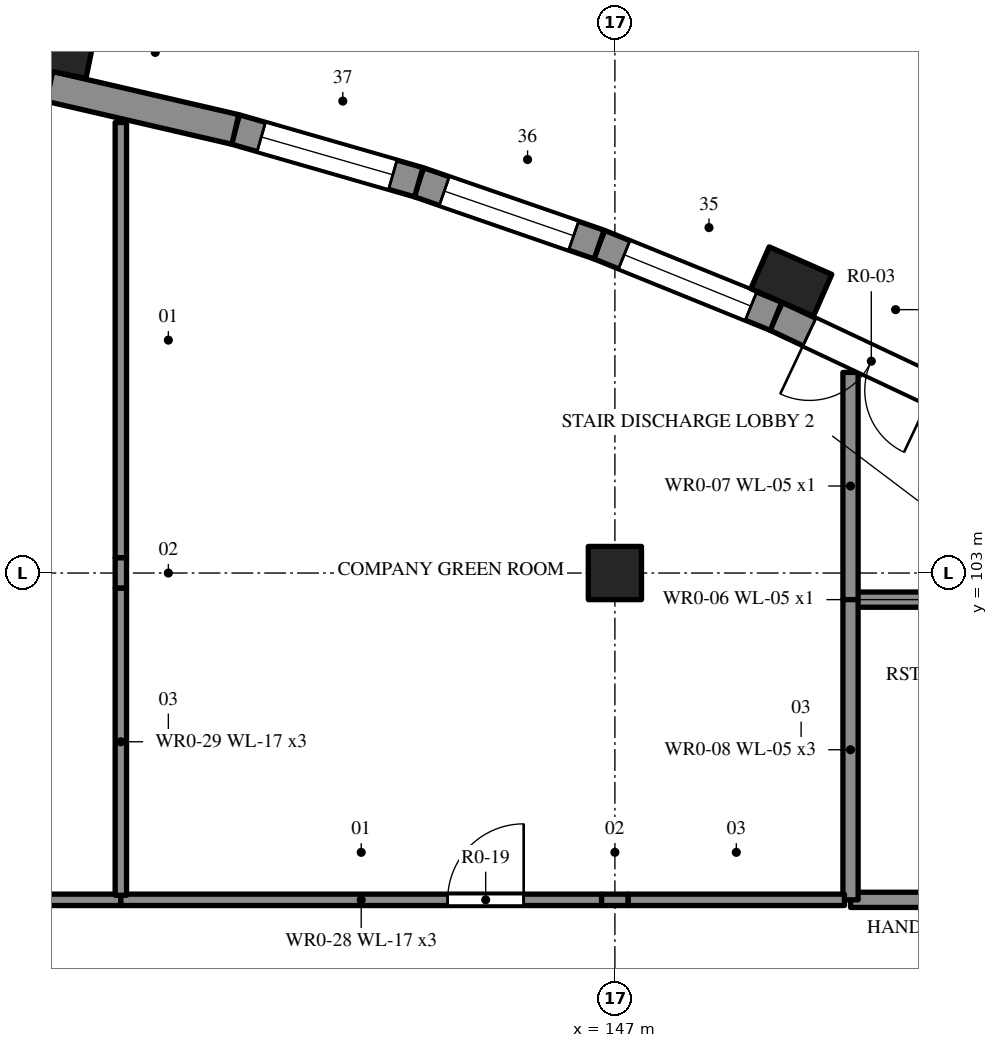
"""IFC4 building model, lengths in metres.
Left out: names, types, materials, properties, quantities, classifications, styles, units other than length and angle.
Written with IfcOpenShell. Run it as: python <this file> out.ifc"""

import sys

from ifc_helpers import new_model, si_unit, direction, frame, frame_2d, origin, origin_2d, place, context, subcontext, project, spatial, rectangle, extrude, element, fill, save


model = new_model("IFC4")
c1 = context("Model", 3, precision=1e-05, world=origin(), true_north=direction((0.0, 1.0)))
c2 = subcontext(c1, "Body", "Model", "MODEL_VIEW")
j1 = project(units=[si_unit("LENGTHUNIT", "METRE"), si_unit("PLANEANGLEUNIT", "RADIAN")], contexts=[c1])
p1 = place(None, origin())
s1 = spatial("IfcSite", under=j1, at=p1, CompositionType="ELEMENT")
p2 = place(p1, origin())
s2 = spatial("IfcBuilding", under=s1, at=p2, CompositionType="ELEMENT")
p3 = place(p2, origin())
s3 = spatial("IfcBuildingStorey", under=s2, at=p3, CompositionType="ELEMENT", Elevation=0.0)
p4 = place(p3, frame((147.0, 103.0, -0.25), z_axis=(0.0, 0.0, 1.0), x_axis=(1.0, 0.0, 0.0)))
e1 = element("IfcColumn", 1, at=p4, inside=s3, PredefinedType="COLUMN", context=c2, shape_type="SweptSolid", body=[
    extrude(rectangle(XDim=0.7, YDim=0.7, at=origin_2d()), origin(), (0.0, 0.0, 1.0), 5.37),
])
p5 = place(p3, frame((150.1, 102.65, -0.25), z_axis=(0.0, 0.0, 1.0), x_axis=(1.0, 0.0, 0.0)))
e2 = element("IfcWall", 2, at=p5, inside=s3, PredefinedType="SHEAR", context=c2, shape_type="SweptSolid", body=[
    extrude(rectangle(XDim=5.451, YDim=0.2, at=frame_2d((2.726, 0.0))), origin(), (0.0, 0.0, 1.0), 5.65),
])
p6 = place(p5, frame((2.223, 0.0, 0.25)))
e3 = element("IfcOpeningElement", 3, at=p6, cuts=e2, PredefinedType="OPENING", context=c2, shape_type="SweptSolid", body=[
    extrude(rectangle(XDim=1.1, YDim=2.1, at=frame_2d((0.55, 1.05))), frame((0.0, 0.11, 0.0), z_axis=(0.0, -1.0, 0.0), x_axis=(1.0, 0.0, 0.0)), (0.0, 0.0, 1.0), 0.22),
])
p7 = place(p3, frame((150.1, 102.65, -0.25), z_axis=(0.0, 0.0, 1.0), x_axis=(0.0, 1.0, 0.0)))
e4 = element("IfcWall", 4, at=p7, inside=s3, PredefinedType="SHEAR", context=c2, shape_type="SweptSolid", body=[
    extrude(rectangle(XDim=2.99, YDim=0.2, at=frame_2d((1.495, 0.0))), origin(), (0.0, 0.0, 1.0), 5.65),
])
p8 = place(p3, frame((158.3, 98.7, -0.25), z_axis=(0.0, 0.0, 1.0), x_axis=(-1.0, 0.0, 0.0)))
e5 = element("IfcWall", 5, at=p8, inside=s3, PredefinedType="SHEAR", context=c2, shape_type="SweptSolid", body=[
    extrude(rectangle(XDim=8.2, YDim=0.2, at=frame_2d((4.1, 0.0))), origin(), (0.0, 0.0, 1.0), 5.65),
])
p9 = place(p8, frame((0.25, 0.0, 0.25)))
e6 = element("IfcOpeningElement", 6, at=p9, cuts=e5, PredefinedType="OPENING", context=c2, shape_type="SweptSolid", body=[
    extrude(rectangle(XDim=1.0, YDim=2.4, at=frame_2d((0.5, 1.2))), frame((0.0, 0.11, 0.0), z_axis=(0.0, -1.0, 0.0), x_axis=(1.0, 0.0, 0.0)), (0.0, 0.0, 1.0), 0.22),
])
p10 = place(p3, frame((150.1, 98.7, -0.25), z_axis=(0.0, 0.0, 1.0), x_axis=(0.0, 1.0, 0.0)))
e7 = element("IfcWall", 7, at=p10, inside=s3, PredefinedType="SHEAR", context=c2, shape_type="SweptSolid", body=[
    extrude(rectangle(XDim=3.95, YDim=0.2, at=frame_2d((1.975, 0.0))), origin(), (0.0, 0.0, 1.0), 5.65),
])
p11 = place(p3, frame((151.627, 105.196, -0.25), z_axis=(0.0, 0.0, 1.0), x_axis=(-0.904561064695, 0.42634408667, 0.0)))
e8 = element("IfcWall", 8, at=p11, inside=s3, PredefinedType="SOLIDWALL", context=c2, shape_type="SweptSolid", body=[
    extrude(rectangle(XDim=2.772, YDim=0.4, at=frame_2d((1.386, 0.0))), origin(), (0.0, 0.0, 1.0), 5.65),
])
p12 = place(p11, frame((0.486, 0.0, 0.25)))
e9 = element("IfcOpeningElement", 9, at=p12, cuts=e8, PredefinedType="OPENING", context=c2, shape_type="SweptSolid", body=[
    extrude(rectangle(XDim=1.8, YDim=2.4, at=frame_2d((0.9, 1.2))), frame((0.0, 0.21, 0.0), z_axis=(0.0, -1.0, 0.0), x_axis=(1.0, 0.0, 0.0)), (0.0, 0.0, 1.0), 0.42),
])
p13 = place(p3, frame((149.12, 106.378, -0.25), z_axis=(0.0, 0.0, 1.0), x_axis=(-0.926688932252, 0.375829246921, 0.0)))
e10 = element("IfcWall", 10, at=p13, inside=s3, PredefinedType="SOLIDWALL", context=c2, shape_type="SweptSolid", body=[
    extrude(rectangle(XDim=2.511, YDim=0.4, at=frame_2d((1.255, 0.0))), origin(), (0.0, 0.0, 1.0), 5.65),
])
p14 = place(p13, frame((0.355, 0.0, 1.25)))
e11 = element("IfcOpeningElement", 11, at=p14, cuts=e10, PredefinedType="OPENING", context=c2, shape_type="SweptSolid", body=[
    extrude(rectangle(XDim=1.8, YDim=2.1, at=frame_2d((0.9, 1.05))), frame((0.0, 0.21, 0.0), z_axis=(0.0, -1.0, 0.0), x_axis=(1.0, 0.0, 0.0)), (0.0, 0.0, 1.0), 0.42),
])
p15 = place(p3, frame((146.793, 107.322, -0.25), z_axis=(0.0, 0.0, 1.0), x_axis=(-0.945175475032, 0.326562890417, 0.0)))
e12 = element("IfcWall", 12, at=p15, inside=s3, PredefinedType="SOLIDWALL", context=c2, shape_type="SweptSolid", body=[
    extrude(rectangle(XDim=2.511, YDim=0.4, at=frame_2d((1.256, 0.0))), origin(), (0.0, 0.0, 1.0), 5.65),
])
p16 = place(p15, frame((0.355, 0.0, 1.25)))
e13 = element("IfcOpeningElement", 13, at=p16, cuts=e12, PredefinedType="OPENING", context=c2, shape_type="SweptSolid", body=[
    extrude(rectangle(XDim=1.8, YDim=2.1, at=frame_2d((0.9, 1.05))), frame((0.0, 0.21, 0.0), z_axis=(0.0, -1.0, 0.0), x_axis=(1.0, 0.0, 0.0)), (0.0, 0.0, 1.0), 0.42),
])
p17 = place(p3, frame((144.419, 108.142, -0.25), z_axis=(0.0, 0.0, 1.0), x_axis=(-0.961008605775, 0.276518461637, 0.0)))
e14 = element("IfcWall", 14, at=p17, inside=s3, PredefinedType="SOLIDWALL", context=c2, shape_type="SweptSolid", body=[
    extrude(rectangle(XDim=2.511, YDim=0.4, at=frame_2d((1.255, 0.0))), origin(), (0.0, 0.0, 1.0), 5.65),
])
p18 = place(p17, frame((0.355, 0.0, 1.25)))
e15 = element("IfcOpeningElement", 15, at=p18, cuts=e14, PredefinedType="OPENING", context=c2, shape_type="SweptSolid", body=[
    extrude(rectangle(XDim=1.8, YDim=2.1, at=frame_2d((0.9, 1.05))), frame((0.0, 0.21, 0.0), z_axis=(0.0, -1.0, 0.0), x_axis=(1.0, 0.0, 0.0)), (0.0, 0.0, 1.0), 0.42),
])
p19 = place(p3, frame((142.006, 108.836, -0.25), z_axis=(0.0, 0.0, 1.0), x_axis=(-0.974189274843, 0.225732710925, 0.0)))
e16 = element("IfcWall", 16, at=p19, inside=s3, PredefinedType="SOLIDWALL", context=c2, shape_type="SweptSolid", body=[
    extrude(rectangle(XDim=2.511, YDim=0.4, at=frame_2d((1.256, 0.0))), origin(), (0.0, 0.0, 1.0), 5.65),
])
for number, where, z_axis, x_axis in (
    (17, (139.66, 109.893, -0.25), (0.0, 0.0, 1.0), (-0.98, 0.201, 0.0)),
    (18, (149.321, 106.836, -0.25), (0.0, 0.0, 1.0), (-0.915, 0.403, 0.0)),
):
    element("IfcColumn", number, at=place(p3, frame(where, z_axis=z_axis, x_axis=x_axis)), inside=s3, PredefinedType="PILASTER", context=c2, shape_type="SweptSolid", body=[
        extrude(rectangle(XDim=0.9, YDim=0.6, at=origin_2d()), origin(), (0.0, 0.0, 1.0), 5.65),
    ])
p20 = place(p3, frame((138.175, 98.7, 0.0), z_axis=(0.0, 0.0, 1.0), x_axis=(1.0, 0.0, 0.0)))
e19 = element("IfcWall", 19, at=p20, inside=s3, PredefinedType="PARTITIONING", context=c2, shape_type="SweptSolid", body=[
    extrude(rectangle(XDim=2.325, YDim=0.15, at=frame_2d((1.163, 0.0))), origin(), (0.0, 0.0, 1.0), 5.12),
])
p21 = place(p3, frame((140.5, 98.7, 0.0), z_axis=(0.0, 0.0, 1.0), x_axis=(1.0, 0.0, 0.0)))
e20 = element("IfcWall", 20, at=p21, inside=s3, PredefinedType="PARTITIONING", context=c2, shape_type="SweptSolid", body=[
    extrude(rectangle(XDim=6.325, YDim=0.15, at=frame_2d((3.163, 0.0))), origin(), (0.0, 0.0, 1.0), 5.12),
])
p22 = place(p21, frame((4.3, 0.0, 0.0)))
e21 = element("IfcOpeningElement", 21, at=p22, cuts=e20, PredefinedType="OPENING", context=c2, shape_type="SweptSolid", body=[
    extrude(rectangle(XDim=1.0, YDim=2.1, at=frame_2d((0.5, 1.05))), frame((0.0, 0.085, 0.0), z_axis=(0.0, -1.0, 0.0), x_axis=(1.0, 0.0, 0.0)), (0.0, 0.0, 1.0), 0.17),
])
p23 = place(p3, frame((146.825, 98.7, 0.0), z_axis=(0.0, 0.0, 1.0), x_axis=(1.0, 0.0, 0.0)))
e22 = element("IfcWall", 22, at=p23, inside=s3, PredefinedType="PARTITIONING", context=c2, shape_type="SweptSolid", body=[
    extrude(rectangle(XDim=0.35, YDim=0.15, at=frame_2d((0.175, 0.0))), origin(), (0.0, 0.0, 1.0), 4.42),
])
p24 = place(p3, frame((147.175, 98.7, 0.0), z_axis=(0.0, 0.0, 1.0), x_axis=(1.0, 0.0, 0.0)))
e23 = element("IfcWall", 23, at=p24, inside=s3, PredefinedType="PARTITIONING", context=c2, shape_type="SweptSolid", body=[
    extrude(rectangle(XDim=2.845, YDim=0.15, at=frame_2d((1.422, 0.0))), origin(), (0.0, 0.0, 1.0), 5.12),
])
p25 = place(p3, frame((140.5, 108.928, 0.0), z_axis=(0.0, 0.0, 1.0), x_axis=(0.0, -1.0, 0.0)))
e24 = element("IfcWall", 24, at=p25, inside=s3, PredefinedType="PARTITIONING", context=c2, shape_type="SweptSolid", body=[
    extrude(rectangle(XDim=5.729, YDim=0.15, at=frame_2d((2.864, 0.0))), origin(), (0.0, 0.0, 1.0), 5.12),
])
p26 = place(p3, frame((140.5, 103.2, 0.0), z_axis=(0.0, 0.0, 1.0), x_axis=(0.0, -1.0, 0.0)))
e25 = element("IfcWall", 25, at=p26, inside=s3, PredefinedType="PARTITIONING", context=c2, shape_type="SweptSolid", body=[
    extrude(rectangle(XDim=0.4, YDim=0.15, at=frame_2d((0.2, 0.0))), origin(), (0.0, 0.0, 1.0), 4.32),
])
p27 = place(p3, frame((140.5, 102.8, 0.0), z_axis=(0.0, 0.0, 1.0), x_axis=(0.0, -1.0, 0.0)))
e26 = element("IfcWall", 26, at=p27, inside=s3, PredefinedType="PARTITIONING", context=c2, shape_type="SweptSolid", body=[
    extrude(rectangle(XDim=4.04, YDim=0.15, at=frame_2d((2.02, 0.0))), origin(), (0.0, 0.0, 1.0), 5.12),
])
p28 = place(p12, origin())
e27 = element("IfcDoor", 27, at=p28, inside=s3, OperationType="DOUBLE_DOOR_SINGLE_SWING", PredefinedType="DOOR", context=c2, shape_type="SweptSolid", body=[
    extrude(rectangle(XDim=1.8, YDim=2.4, at=frame_2d((0.9, 1.2))), frame((0.0, 0.025, 0.0), z_axis=(0.0, -1.0, 0.0), x_axis=(1.0, 0.0, 0.0)), (0.0, 0.0, 1.0), 0.05),
])
fill(e9, e27)
p29 = place(p14, origin())
e28 = element("IfcWindow", 28, at=p29, inside=s3, PartitioningType="SINGLE_PANEL", PredefinedType="WINDOW", context=c2, shape_type="SweptSolid", body=[
    extrude(rectangle(XDim=1.8, YDim=2.1, at=frame_2d((0.9, 1.05))), frame((0.0, 0.03, 0.0), z_axis=(0.0, -1.0, 0.0), x_axis=(1.0, 0.0, 0.0)), (0.0, 0.0, 1.0), 0.06),
])
fill(e11, e28)
p30 = place(p16, origin())
e29 = element("IfcWindow", 29, at=p30, inside=s3, PartitioningType="SINGLE_PANEL", PredefinedType="WINDOW", context=c2, shape_type="SweptSolid", body=[
    extrude(rectangle(XDim=1.8, YDim=2.1, at=frame_2d((0.9, 1.05))), frame((0.0, 0.03, 0.0), z_axis=(0.0, -1.0, 0.0), x_axis=(1.0, 0.0, 0.0)), (0.0, 0.0, 1.0), 0.06),
])
fill(e13, e29)
p31 = place(p18, origin())
e30 = element("IfcWindow", 30, at=p31, inside=s3, PartitioningType="SINGLE_PANEL", PredefinedType="WINDOW", context=c2, shape_type="SweptSolid", body=[
    extrude(rectangle(XDim=1.8, YDim=2.1, at=frame_2d((0.9, 1.05))), frame((0.0, 0.03, 0.0), z_axis=(0.0, -1.0, 0.0), x_axis=(1.0, 0.0, 0.0)), (0.0, 0.0, 1.0), 0.06),
])
fill(e15, e30)
p32 = place(p22, origin())
e31 = element("IfcDoor", 31, at=p32, inside=s3, OperationType="SINGLE_SWING_RIGHT", PredefinedType="DOOR", context=c2, shape_type="SweptSolid", body=[
    extrude(rectangle(XDim=1.0, YDim=2.1, at=frame_2d((0.5, 1.05))), frame((0.0, 0.025, 0.0), z_axis=(0.0, -1.0, 0.0), x_axis=(1.0, 0.0, 0.0)), (0.0, 0.0, 1.0), 0.05),
])
fill(e21, e31)
save(model, sys.argv[1])
